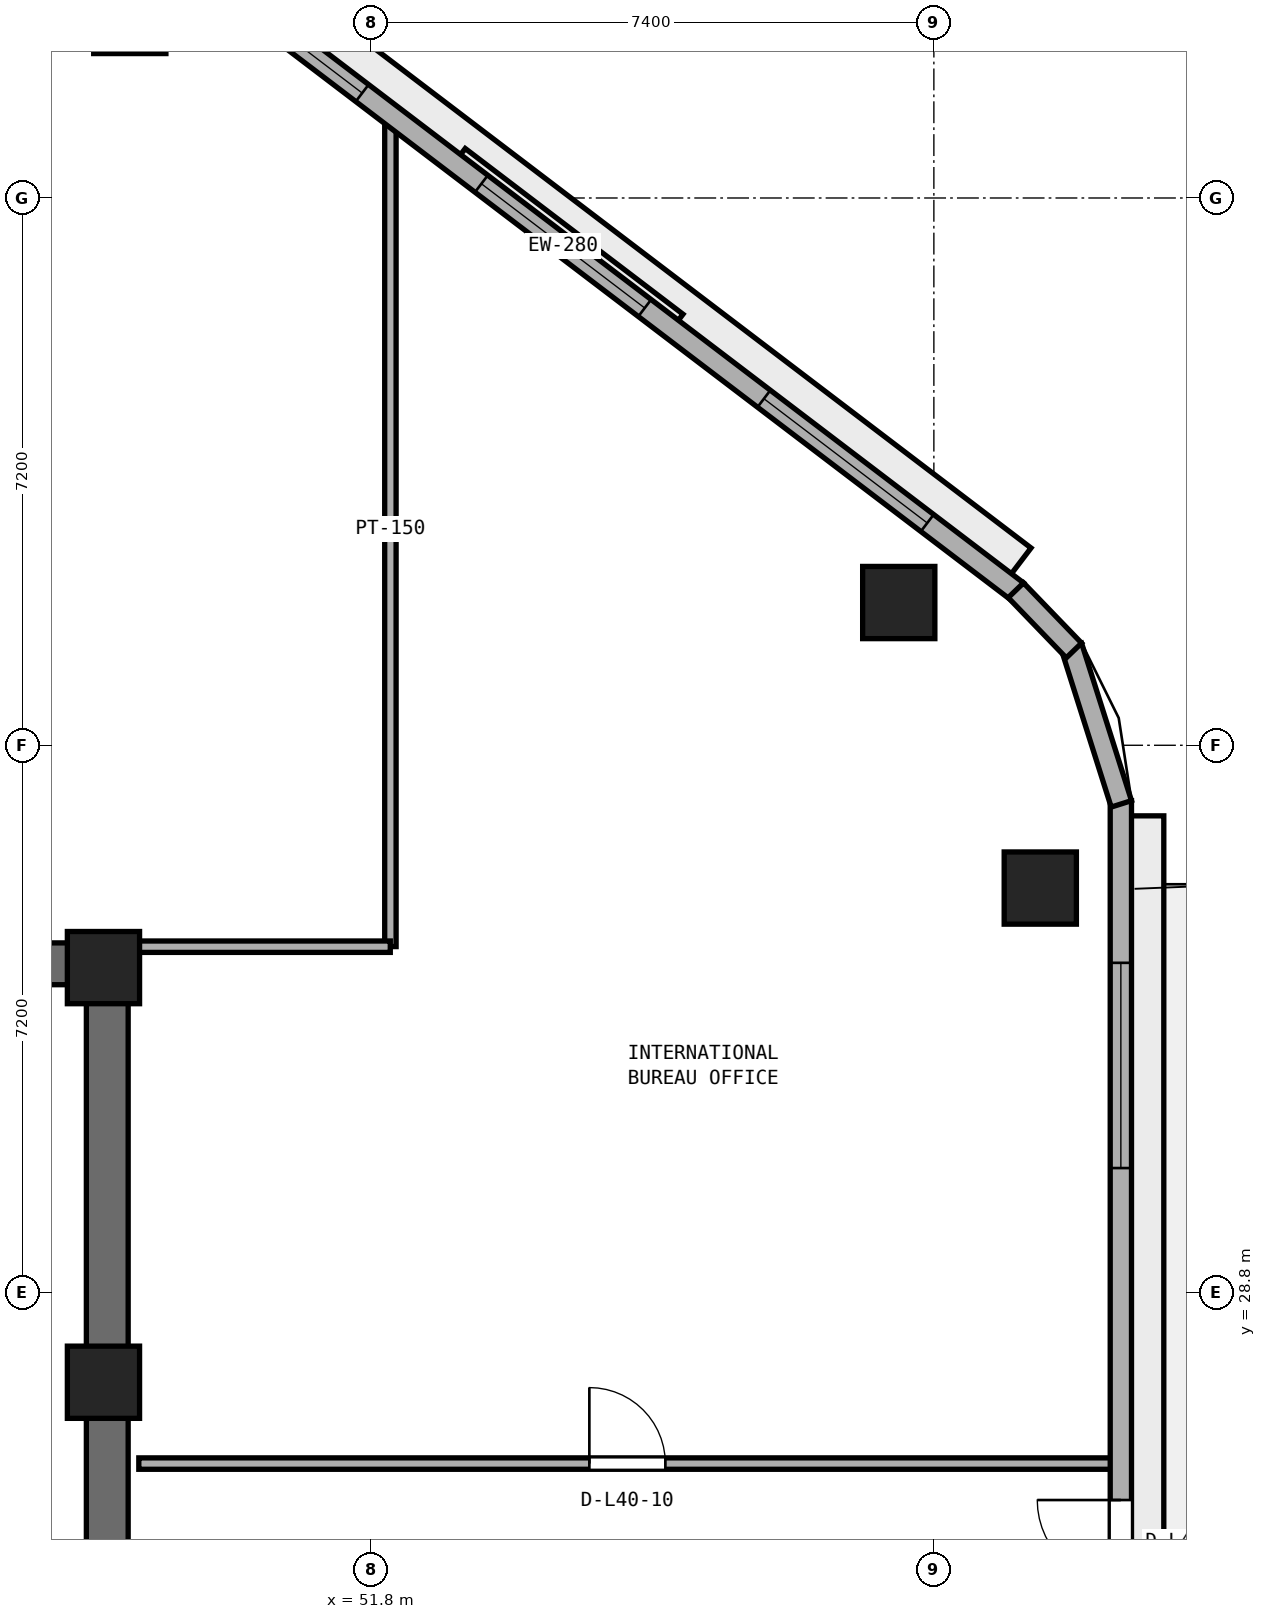
"""IFC4 building model, lengths in metres.
Left out: names, types, materials, properties, quantities, classifications, styles, units other than length and angle.
Written with IfcOpenShell. Run it as: python <this file> out.ifc"""

import sys

from ifc_helpers import new_model, si_unit, direction, frame, frame_2d, origin, origin_2d, place, context, subcontext, project, spatial, rectangle, extrude, element, fill, save


model = new_model("IFC4")
c1 = context("Model", 3, precision=1e-05, world=origin(), true_north=direction((0.0, 1.0)))
c2 = subcontext(c1, "Body", "Model", "MODEL_VIEW")
j1 = project(units=[si_unit("LENGTHUNIT", "METRE"), si_unit("PLANEANGLEUNIT", "RADIAN")], contexts=[c1])
p1 = place(None, origin())
s1 = spatial("IfcSite", under=j1, at=p1, CompositionType="ELEMENT")
p2 = place(p1, origin())
s2 = spatial("IfcBuilding", under=s1, at=p2, CompositionType="ELEMENT")
p3 = place(p2, frame((0.0, 0.0, 159.2)))
s3 = spatial("IfcBuildingStorey", under=s2, at=p3, CompositionType="ELEMENT", Elevation=159.2)
p4 = place(p3, frame((25.4, 33.125, 0.0), z_axis=(0.0, 0.0, 1.0), x_axis=(1.0, 0.0, 0.0)))
e1 = element("IfcWall", 1, at=p4, inside=s3, PredefinedType="SHEAR", context=c2, shape_type="SweptSolid", body=[
    extrude(rectangle(XDim=23.2, YDim=0.55, at=frame_2d((11.6, 0.0))), origin(), (0.0, 0.0, 1.0), 3.54),
])
p5 = place(p3, frame((48.325, 17.55, 0.0), z_axis=(0.0, 0.0, 1.0), x_axis=(0.0, 1.0, 0.0)))
e2 = element("IfcWall", 2, at=p5, inside=s3, PredefinedType="SHEAR", context=c2, shape_type="SweptSolid", body=[
    extrude(rectangle(XDim=15.3, YDim=0.55, at=frame_2d((7.65, 0.0))), origin(), (0.0, 0.0, 1.0), 3.54),
])
p6 = place(p5, frame((5.75, 0.0, 0.0)))
e3 = element("IfcOpeningElement", 3, at=p6, cuts=e2, PredefinedType="OPENING", context=c2, shape_type="SweptSolid", body=[
    extrude(rectangle(XDim=1.5, YDim=2.15, at=frame_2d((0.75, 1.075))), frame((0.0, 0.285, 0.0), z_axis=(0.0, -1.0, 0.0), x_axis=(1.0, 0.0, 0.0)), (0.0, 0.0, 1.0), 0.57),
])
for number, where, z_axis, x_axis in (
    (4, (48.275, 27.62, 0.0), (0.0, 0.0, 1.0), (1.0, 0.0, 0.0)),
    (5, (48.275, 33.075, 0.0), (0.0, 0.0, 1.0), (1.0, 0.0, 0.0)),
):
    element("IfcColumn", number, at=place(p3, frame(where, z_axis=z_axis, x_axis=x_axis)), inside=s3, PredefinedType="PILASTER", context=c2, shape_type="SweptSolid", body=[
        extrude(rectangle(XDim=0.95, YDim=0.95, at=origin_2d()), origin(), (0.0, 0.0, 1.0), 3.8),
    ])
for number, where, z_axis, x_axis in (
    (6, (60.6, 34.122, 0.0), (0.0, 0.0, 1.0), (1.0, 0.0, 0.0)),
    (7, (58.738, 37.878, 0.0), (0.0, 0.0, 1.0), (1.0, 0.0, 0.0)),
    (8, (48.622, 45.575, 0.0), (0.0, 0.0, 1.0), (1.0, 0.0, 0.0)),
):
    element("IfcColumn", number, at=place(p3, frame(where, z_axis=z_axis, x_axis=x_axis)), inside=s3, PredefinedType="COLUMN", context=c2, shape_type="SweptSolid", body=[
        extrude(rectangle(XDim=0.95, YDim=0.95, at=origin_2d()), origin(), (0.0, 0.0, 1.0), 3.8),
    ])
p7 = place(p3, frame((52.05, 33.352, 0.0), z_axis=(0.0, 0.0, 1.0), x_axis=(0.0, 1.0, 0.0)))
e9 = element("IfcWall", 9, at=p7, inside=s3, PredefinedType="PARTITIONING", context=c2, shape_type="SweptSolid", body=[
    extrude(rectangle(XDim=10.983, YDim=0.15, at=frame_2d((5.491, 0.0))), origin(), (0.0, 0.0, 1.0), 3.54),
])
p8 = place(p3, frame((48.74, 26.55, 0.0), z_axis=(0.0, 0.0, 1.0), x_axis=(1.0, 0.0, 0.0)))
e10 = element("IfcWall", 10, at=p8, inside=s3, PredefinedType="PARTITIONING", context=c2, shape_type="SweptSolid", body=[
    extrude(rectangle(XDim=12.855, YDim=0.15, at=frame_2d((6.427, 0.0))), origin(), (0.0, 0.0, 1.0), 3.54),
])
p9 = place(p8, frame((5.927, 0.0, 0.0)))
e11 = element("IfcOpeningElement", 11, at=p9, cuts=e10, PredefinedType="OPENING", context=c2, shape_type="SweptSolid", body=[
    extrude(rectangle(XDim=1.0, YDim=2.12, at=frame_2d((0.5, 1.06))), frame((0.0, 0.085, 0.0), z_axis=(0.0, -1.0, 0.0), x_axis=(1.0, 0.0, 0.0)), (0.0, 0.0, 1.0), 0.17),
])
p10 = place(p3, frame((48.74, 33.35, 0.0), z_axis=(0.0, 0.0, 1.0), x_axis=(1.0, 0.0, 0.0)))
e12 = element("IfcWall", 12, at=p10, inside=s3, PredefinedType="PARTITIONING", context=c2, shape_type="SweptSolid", body=[
    extrude(rectangle(XDim=3.309, YDim=0.15, at=frame_2d((1.654, 0.0))), origin(), (0.0, 0.0, 1.0), 2.923),
])
p11 = place(p3, frame((61.66, 16.369, 0.0), z_axis=(0.0, 0.0, 1.0), x_axis=(0.0, 1.0, 0.0)))
e13 = element("IfcWall", 13, at=p11, inside=s3, PredefinedType="STANDARD", context=c2, shape_type="SweptSolid", body=[
    extrude(rectangle(XDim=18.902, YDim=0.28, at=frame_2d((9.451, 0.0))), origin(), (0.0, 0.0, 1.0), 3.54),
])
p12 = place(p11, frame((8.601, 0.0, 0.0)))
e14 = element("IfcOpeningElement", 14, at=p12, cuts=e13, PredefinedType="OPENING", context=c2, shape_type="SweptSolid", body=[
    extrude(rectangle(XDim=1.1, YDim=2.2, at=frame_2d((0.55, 1.1))), frame((0.0, 0.15, 0.0), z_axis=(0.0, -1.0, 0.0), x_axis=(1.0, 0.0, 0.0)), (0.0, 0.0, 1.0), 0.3),
])
p13 = place(p11, frame((2.134, 0.0, 0.9)))
e15 = element("IfcOpeningElement", 15, at=p13, cuts=e13, PredefinedType="OPENING", context=c2, shape_type="SweptSolid", body=[
    extrude(rectangle(XDim=2.7, YDim=1.75, at=frame_2d((1.35, 0.875))), frame((0.0, 0.15, 0.0), z_axis=(0.0, -1.0, 0.0), x_axis=(1.0, 0.0, 0.0)), (0.0, 0.0, 1.0), 0.3),
])
p14 = place(p11, frame((14.069, 0.0, 0.9)))
e16 = element("IfcOpeningElement", 16, at=p14, cuts=e13, PredefinedType="OPENING", context=c2, shape_type="SweptSolid", body=[
    extrude(rectangle(XDim=2.7, YDim=1.75, at=frame_2d((1.35, 0.875))), frame((0.0, 0.15, 0.0), z_axis=(0.0, -1.0, 0.0), x_axis=(1.0, 0.0, 0.0)), (0.0, 0.0, 1.0), 0.3),
])
p15 = place(p3, frame((60.295, 38.025, 0.0), z_axis=(0.0, 0.0, 1.0), x_axis=(-0.795831760834, 0.605517801925, 0.0)))
e17 = element("IfcWall", 17, at=p15, inside=s3, PredefinedType="STANDARD", context=c2, shape_type="SweptSolid", body=[
    extrude(rectangle(XDim=15.012, YDim=0.28, at=frame_2d((7.506, 0.0))), origin(), (0.0, 0.0, 1.0), 3.54),
])
p16 = place(p15, frame((1.485, 0.0, 0.9)))
e18 = element("IfcOpeningElement", 18, at=p16, cuts=e17, PredefinedType="OPENING", context=c2, shape_type="SweptSolid", body=[
    extrude(rectangle(XDim=2.7, YDim=1.75, at=frame_2d((1.35, 0.875))), frame((0.0, 0.15, 0.0), z_axis=(0.0, -1.0, 0.0), x_axis=(1.0, 0.0, 0.0)), (0.0, 0.0, 1.0), 0.3),
])
p17 = place(p15, frame((6.156, 0.0, 0.9)))
e19 = element("IfcOpeningElement", 19, at=p17, cuts=e17, PredefinedType="OPENING", context=c2, shape_type="SweptSolid", body=[
    extrude(rectangle(XDim=2.7, YDim=1.75, at=frame_2d((1.35, 0.875))), frame((0.0, 0.15, 0.0), z_axis=(0.0, -1.0, 0.0), x_axis=(1.0, 0.0, 0.0)), (0.0, 0.0, 1.0), 0.3),
])
p18 = place(p15, frame((10.826, 0.0, 0.9)))
e20 = element("IfcOpeningElement", 20, at=p18, cuts=e17, PredefinedType="OPENING", context=c2, shape_type="SweptSolid", body=[
    extrude(rectangle(XDim=2.7, YDim=1.75, at=frame_2d((1.35, 0.875))), frame((0.0, 0.15, 0.0), z_axis=(0.0, -1.0, 0.0), x_axis=(1.0, 0.0, 0.0)), (0.0, 0.0, 1.0), 0.3),
])
p19 = place(p3, frame((61.667, 35.229, 0.0), z_axis=(0.0, 0.0, 1.0), x_axis=(-0.302044777107, 0.953293738898, 0.0)))
e21 = element("IfcWall", 21, at=p19, inside=s3, PredefinedType="STANDARD", context=c2, shape_type="SweptSolid", body=[
    extrude(rectangle(XDim=2.174, YDim=0.28, at=frame_2d((1.087, 0.0))), origin(), (0.0, 0.0, 1.0), 3.54),
])
p20 = place(p3, frame((61.042, 37.247, 0.0), z_axis=(0.0, 0.0, 1.0), x_axis=(-0.694004126367, 0.719971022045, 0.0)))
e22 = element("IfcWall", 22, at=p20, inside=s3, PredefinedType="STANDARD", context=c2, shape_type="SweptSolid", body=[
    extrude(rectangle(XDim=1.1, YDim=0.28, at=frame_2d((0.55, 0.0))), origin(), (0.0, 0.0, 1.0), 3.54),
])
p21 = place(p9, origin())
e23 = element("IfcDoor", 23, at=p21, inside=s3, OperationType="SINGLE_SWING_LEFT", PredefinedType="DOOR", context=c2, shape_type="SweptSolid", body=[
    extrude(rectangle(XDim=1.0, YDim=2.12, at=frame_2d((0.5, 1.06))), frame((0.0, 0.025, 0.0), z_axis=(0.0, -1.0, 0.0), x_axis=(1.0, 0.0, 0.0)), (0.0, 0.0, 1.0), 0.05),
])
fill(e11, e23)
p22 = place(p12, origin())
e24 = element("IfcDoor", 24, at=p22, inside=s3, OperationType="SINGLE_SWING_RIGHT", PredefinedType="DOOR", context=c2, shape_type="SweptSolid", body=[
    extrude(rectangle(XDim=1.1, YDim=2.2, at=frame_2d((0.55, 1.1))), frame((0.0, 0.025, 0.0), z_axis=(0.0, -1.0, 0.0), x_axis=(1.0, 0.0, 0.0)), (0.0, 0.0, 1.0), 0.05),
])
fill(e14, e24)
p23 = place(p14, origin())
e25 = element("IfcWindow", 25, at=p23, inside=s3, PartitioningType="SINGLE_PANEL", PredefinedType="WINDOW", context=c2, shape_type="SweptSolid", body=[
    extrude(rectangle(XDim=2.7, YDim=1.75, at=frame_2d((1.35, 0.875))), frame((0.0, 0.03, 0.0), z_axis=(0.0, -1.0, 0.0), x_axis=(1.0, 0.0, 0.0)), (0.0, 0.0, 1.0), 0.06),
])
fill(e16, e25)
p24 = place(p16, origin())
e26 = element("IfcWindow", 26, at=p24, inside=s3, PartitioningType="SINGLE_PANEL", PredefinedType="WINDOW", context=c2, shape_type="SweptSolid", body=[
    extrude(rectangle(XDim=2.7, YDim=1.75, at=frame_2d((1.35, 0.875))), frame((0.0, 0.03, 0.0), z_axis=(0.0, -1.0, 0.0), x_axis=(1.0, 0.0, 0.0)), (0.0, 0.0, 1.0), 0.06),
])
fill(e18, e26)
p25 = place(p17, origin())
e27 = element("IfcWindow", 27, at=p25, inside=s3, PartitioningType="SINGLE_PANEL", PredefinedType="WINDOW", context=c2, shape_type="SweptSolid", body=[
    extrude(rectangle(XDim=2.7, YDim=1.75, at=frame_2d((1.35, 0.875))), frame((0.0, 0.03, 0.0), z_axis=(0.0, -1.0, 0.0), x_axis=(1.0, 0.0, 0.0)), (0.0, 0.0, 1.0), 0.06),
])
fill(e19, e27)
p26 = place(p18, origin())
e28 = element("IfcWindow", 28, at=p26, inside=s3, PartitioningType="SINGLE_PANEL", PredefinedType="WINDOW", context=c2, shape_type="SweptSolid", body=[
    extrude(rectangle(XDim=2.7, YDim=1.75, at=frame_2d((1.35, 0.875))), frame((0.0, 0.03, 0.0), z_axis=(0.0, -1.0, 0.0), x_axis=(1.0, 0.0, 0.0)), (0.0, 0.0, 1.0), 0.06),
])
fill(e20, e28)
save(model, sys.argv[1])
